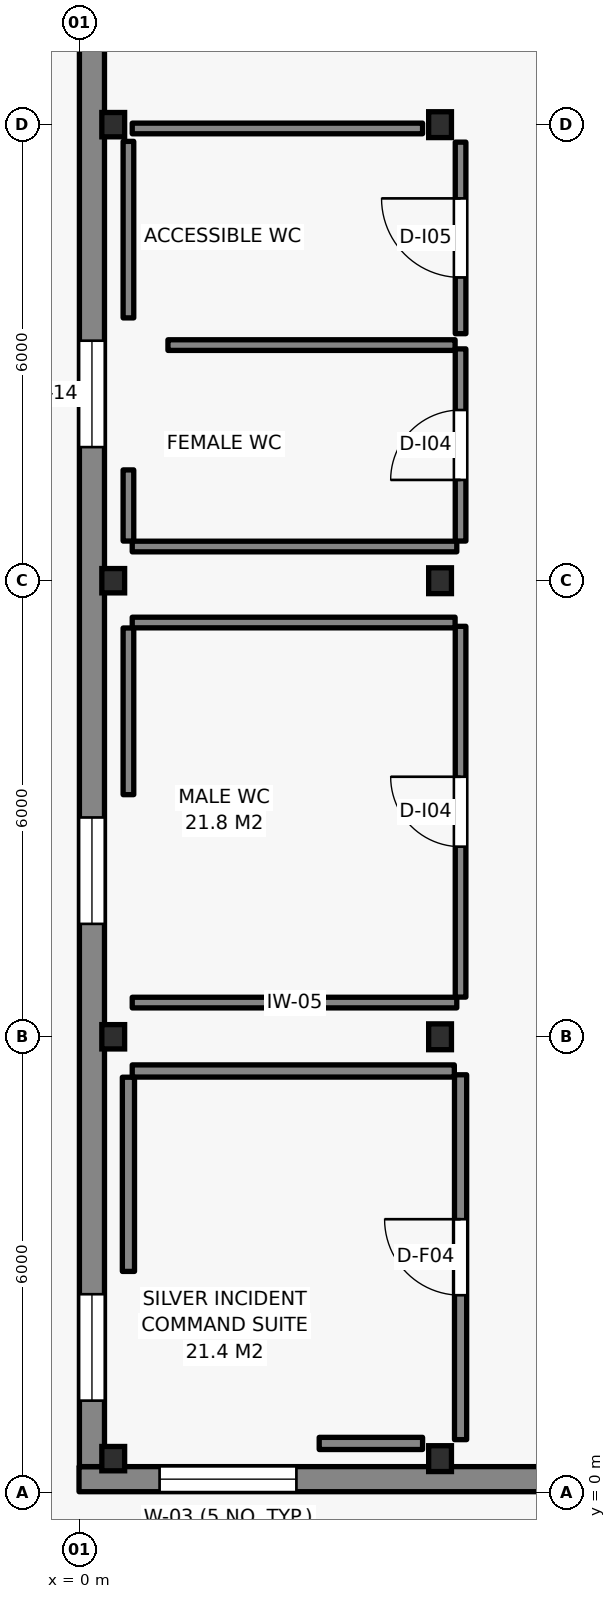
"""IFC4 building model, lengths in metres.
Left out: names, types, materials, properties, quantities, classifications, styles, units other than length and angle.
Written with IfcOpenShell. Run it as: python <this file> out.ifc"""

import sys

from ifc_helpers import new_model, si_unit, direction, frame, frame_2d, origin, origin_2d, place, context, subcontext, project, spatial, rectangle, i_section, extrude, element, fill, save


model = new_model("IFC4")
c1 = context("Model", 3, precision=1e-05, world=origin(), true_north=direction((0.0, 1.0)))
c2 = subcontext(c1, "Body", "Model", "MODEL_VIEW")
j1 = project(units=[si_unit("LENGTHUNIT", "METRE"), si_unit("PLANEANGLEUNIT", "RADIAN")], contexts=[c1])
p1 = place(None, origin())
s1 = spatial("IfcSite", under=j1, at=p1, CompositionType="ELEMENT")
p2 = place(p1, origin())
s2 = spatial("IfcBuilding", under=s1, at=p2, CompositionType="ELEMENT")
p3 = place(p2, frame((0.0, 0.0, 18.75)))
s3 = spatial("IfcBuildingStorey", under=s2, at=p3, CompositionType="ELEMENT", Elevation=18.75)
for number, where, z_axis, x_axis in (
    (1, (0.45, 0.45, 0.0), (0.0, 0.0, 1.0), (1.0, 0.0, 0.0)),
    (2, (0.45, 6.0, 0.0), (0.0, 0.0, 1.0), (1.0, 0.0, 0.0)),
    (3, (0.45, 12.0, 0.0), (0.0, 0.0, 1.0), (1.0, 0.0, 0.0)),
    (4, (0.45, 18.0, 0.0), (0.0, 0.0, 1.0), (1.0, 0.0, 0.0)),
):
    element("IfcColumn", number, at=place(p3, frame(where, z_axis=z_axis, x_axis=x_axis)), inside=s3, PredefinedType="COLUMN", context=c2, shape_type="SweptSolid", body=[
        extrude(i_section(OverallWidth=0.3, OverallDepth=0.32, WebThickness=0.011, FlangeThickness=0.021, FilletRadius=0.027, at=origin_2d()), origin(), (0.0, 0.0, 1.0), 3.71),
    ])
for number, where, z_axis, x_axis in (
    (5, (4.75, 0.45, 0.0), (0.0, 0.0, 1.0), (1.0, 0.0, 0.0)),
    (6, (4.75, 6.0, 0.0), (0.0, 0.0, 1.0), (1.0, 0.0, 0.0)),
    (7, (4.75, 12.0, 0.0), (0.0, 0.0, 1.0), (1.0, 0.0, 0.0)),
    (8, (4.75, 18.0, 0.0), (0.0, 0.0, 1.0), (1.0, 0.0, 0.0)),
):
    element("IfcColumn", number, at=place(p3, frame(where, z_axis=z_axis, x_axis=x_axis)), inside=s3, PredefinedType="COLUMN", context=c2, shape_type="SweptSolid", body=[
        extrude(i_section(OverallWidth=0.3, OverallDepth=0.34, WebThickness=0.012, FlangeThickness=0.021, FilletRadius=0.027, at=origin_2d()), origin(), (0.0, 0.0, 1.0), 3.71),
    ])
p4 = place(p3, frame((0.0, 0.18, 0.0), z_axis=(0.0, 0.0, 1.0), x_axis=(1.0, 0.0, 0.0)))
e9 = element("IfcWall", 9, at=p4, inside=s3, PredefinedType="SOLIDWALL", context=c2, shape_type="SweptSolid", body=[
    extrude(rectangle(XDim=19.6, YDim=0.33, at=frame_2d((9.8, 0.0))), origin(), (0.0, 0.0, 1.0), 3.505),
])
p5 = place(p4, frame((1.06, 0.0, 0.915)))
e10 = element("IfcOpeningElement", 10, at=p5, cuts=e9, PredefinedType="OPENING", context=c2, shape_type="SweptSolid", body=[
    extrude(rectangle(XDim=1.8, YDim=2.35, at=frame_2d((0.9, 1.175))), frame((0.0, 0.175, 0.0), z_axis=(0.0, -1.0, 0.0), x_axis=(1.0, 0.0, 0.0)), (0.0, 0.0, 1.0), 0.35),
])
p6 = place(p4, frame((8.9, 0.0, 0.915)))
e11 = element("IfcOpeningElement", 11, at=p6, cuts=e9, PredefinedType="OPENING", context=c2, shape_type="SweptSolid", body=[
    extrude(rectangle(XDim=1.8, YDim=2.35, at=frame_2d((0.9, 1.175))), frame((0.0, 0.175, 0.0), z_axis=(0.0, -1.0, 0.0), x_axis=(1.0, 0.0, 0.0)), (0.0, 0.0, 1.0), 0.35),
])
p7 = place(p4, frame((12.82, 0.0, 0.915)))
e12 = element("IfcOpeningElement", 12, at=p7, cuts=e9, PredefinedType="OPENING", context=c2, shape_type="SweptSolid", body=[
    extrude(rectangle(XDim=1.8, YDim=2.35, at=frame_2d((0.9, 1.175))), frame((0.0, 0.175, 0.0), z_axis=(0.0, -1.0, 0.0), x_axis=(1.0, 0.0, 0.0)), (0.0, 0.0, 1.0), 0.35),
])
p8 = place(p4, frame((16.74, 0.0, 0.915)))
e13 = element("IfcOpeningElement", 13, at=p8, cuts=e9, PredefinedType="OPENING", context=c2, shape_type="SweptSolid", body=[
    extrude(rectangle(XDim=1.8, YDim=2.35, at=frame_2d((0.9, 1.175))), frame((0.0, 0.175, 0.0), z_axis=(0.0, -1.0, 0.0), x_axis=(1.0, 0.0, 0.0)), (0.0, 0.0, 1.0), 0.35),
])
p9 = place(p3, frame((0.17, 53.66, 0.0), z_axis=(0.0, 0.0, 1.0), x_axis=(0.0, -1.0, 0.0)))
e14 = element("IfcWall", 14, at=p9, inside=s3, PredefinedType="SOLIDWALL", context=c2, shape_type="SweptSolid", body=[
    extrude(rectangle(XDim=53.315, YDim=0.33, at=frame_2d((26.657, 0.0))), origin(), (0.0, 0.0, 1.0), 3.345),
])
p10 = place(p9, frame((0.868, 0.0, 1.005)))
e15 = element("IfcOpeningElement", 15, at=p10, cuts=e14, PredefinedType="OPENING", context=c2, shape_type="SweptSolid", body=[
    extrude(rectangle(XDim=1.4, YDim=2.1, at=frame_2d((0.7, 1.05))), frame((0.0, 0.175, 0.0), z_axis=(0.0, -1.0, 0.0), x_axis=(1.0, 0.0, 0.0)), (0.0, 0.0, 1.0), 0.35),
])
p11 = place(p9, frame((7.14, 0.0, 1.005)))
e16 = element("IfcOpeningElement", 16, at=p11, cuts=e14, PredefinedType="OPENING", context=c2, shape_type="SweptSolid", body=[
    extrude(rectangle(XDim=1.4, YDim=2.1, at=frame_2d((0.7, 1.05))), frame((0.0, 0.175, 0.0), z_axis=(0.0, -1.0, 0.0), x_axis=(1.0, 0.0, 0.0)), (0.0, 0.0, 1.0), 0.35),
])
p12 = place(p9, frame((13.413, 0.0, 1.005)))
e17 = element("IfcOpeningElement", 17, at=p12, cuts=e14, PredefinedType="OPENING", context=c2, shape_type="SweptSolid", body=[
    extrude(rectangle(XDim=1.4, YDim=2.1, at=frame_2d((0.7, 1.05))), frame((0.0, 0.175, 0.0), z_axis=(0.0, -1.0, 0.0), x_axis=(1.0, 0.0, 0.0)), (0.0, 0.0, 1.0), 0.35),
])
p13 = place(p9, frame((19.685, 0.0, 1.005)))
e18 = element("IfcOpeningElement", 18, at=p13, cuts=e14, PredefinedType="OPENING", context=c2, shape_type="SweptSolid", body=[
    extrude(rectangle(XDim=1.4, YDim=2.1, at=frame_2d((0.7, 1.05))), frame((0.0, 0.175, 0.0), z_axis=(0.0, -1.0, 0.0), x_axis=(1.0, 0.0, 0.0)), (0.0, 0.0, 1.0), 0.35),
])
p14 = place(p9, frame((25.958, 0.0, 1.005)))
e19 = element("IfcOpeningElement", 19, at=p14, cuts=e14, PredefinedType="OPENING", context=c2, shape_type="SweptSolid", body=[
    extrude(rectangle(XDim=1.4, YDim=2.1, at=frame_2d((0.7, 1.05))), frame((0.0, 0.175, 0.0), z_axis=(0.0, -1.0, 0.0), x_axis=(1.0, 0.0, 0.0)), (0.0, 0.0, 1.0), 0.35),
])
p15 = place(p9, frame((32.23, 0.0, 1.005)))
e20 = element("IfcOpeningElement", 20, at=p15, cuts=e14, PredefinedType="OPENING", context=c2, shape_type="SweptSolid", body=[
    extrude(rectangle(XDim=1.4, YDim=2.1, at=frame_2d((0.7, 1.05))), frame((0.0, 0.175, 0.0), z_axis=(0.0, -1.0, 0.0), x_axis=(1.0, 0.0, 0.0)), (0.0, 0.0, 1.0), 0.35),
])
p16 = place(p9, frame((38.502, 0.0, 1.005)))
e21 = element("IfcOpeningElement", 21, at=p16, cuts=e14, PredefinedType="OPENING", context=c2, shape_type="SweptSolid", body=[
    extrude(rectangle(XDim=1.4, YDim=2.1, at=frame_2d((0.7, 1.05))), frame((0.0, 0.175, 0.0), z_axis=(0.0, -1.0, 0.0), x_axis=(1.0, 0.0, 0.0)), (0.0, 0.0, 1.0), 0.35),
])
p17 = place(p9, frame((44.775, 0.0, 1.005)))
e22 = element("IfcOpeningElement", 22, at=p17, cuts=e14, PredefinedType="OPENING", context=c2, shape_type="SweptSolid", body=[
    extrude(rectangle(XDim=1.4, YDim=2.1, at=frame_2d((0.7, 1.05))), frame((0.0, 0.175, 0.0), z_axis=(0.0, -1.0, 0.0), x_axis=(1.0, 0.0, 0.0)), (0.0, 0.0, 1.0), 0.35),
])
p18 = place(p9, frame((51.047, 0.0, 1.005)))
e23 = element("IfcOpeningElement", 23, at=p18, cuts=e14, PredefinedType="OPENING", context=c2, shape_type="SweptSolid", body=[
    extrude(rectangle(XDim=1.4, YDim=2.1, at=frame_2d((0.7, 1.05))), frame((0.0, 0.175, 0.0), z_axis=(0.0, -1.0, 0.0), x_axis=(1.0, 0.0, 0.0)), (0.0, 0.0, 1.0), 0.35),
])
p19 = place(p3, frame((3.16, 0.65, 0.0), z_axis=(0.0, 0.0, 1.0), x_axis=(1.0, 0.0, 0.0)))
e24 = element("IfcWall", 24, at=p19, inside=s3, PredefinedType="PARTITIONING", context=c2, shape_type="SweptSolid", body=[
    extrude(rectangle(XDim=1.36, YDim=0.16, at=frame_2d((0.68, 0.0))), origin(), (0.0, 0.0, 1.0), 3.345),
])
p20 = place(p3, frame((5.02, 0.7, 0.0), z_axis=(0.0, 0.0, 1.0), x_axis=(0.0, 1.0, 0.0)))
e25 = element("IfcWall", 25, at=p20, inside=s3, PredefinedType="PARTITIONING", context=c2, shape_type="SweptSolid", body=[
    extrude(rectangle(XDim=4.8, YDim=0.16, at=frame_2d((2.4, 0.0))), origin(), (0.0, 0.0, 1.0), 3.345),
])
p21 = place(p20, frame((1.9, 0.0, 0.0)))
e26 = element("IfcOpeningElement", 26, at=p21, cuts=e25, PredefinedType="OPENING", context=c2, shape_type="SweptSolid", body=[
    extrude(rectangle(XDim=1.0, YDim=2.15, at=frame_2d((0.5, 1.075))), frame((0.0, 0.09, 0.0), z_axis=(0.0, -1.0, 0.0), x_axis=(1.0, 0.0, 0.0)), (0.0, 0.0, 1.0), 0.18),
])
p22 = place(p3, frame((4.938, 5.55, 0.0), z_axis=(0.0, 0.0, 1.0), x_axis=(-1.0, 0.0, 0.0)))
e27 = element("IfcWall", 27, at=p22, inside=s3, PredefinedType="PARTITIONING", context=c2, shape_type="SweptSolid", body=[
    extrude(rectangle(XDim=4.238, YDim=0.16, at=frame_2d((2.119, 0.0))), origin(), (0.0, 0.0, 1.0), 3.345),
])
p23 = place(p3, frame((0.65, 5.468, 0.0), z_axis=(0.0, 0.0, 1.0), x_axis=(0.0, -1.0, 0.0)))
e28 = element("IfcWall", 28, at=p23, inside=s3, PredefinedType="PARTITIONING", context=c2, shape_type="SweptSolid", body=[
    extrude(rectangle(XDim=2.555, YDim=0.16, at=frame_2d((1.277, 0.0))), origin(), (0.0, 0.0, 1.0), 3.345),
])
p24 = place(p3, frame((0.7, 6.45, 0.0), z_axis=(0.0, 0.0, 1.0), x_axis=(1.0, 0.0, 0.0)))
e29 = element("IfcWall", 29, at=p24, inside=s3, PredefinedType="PARTITIONING", context=c2, shape_type="SweptSolid", body=[
    extrude(rectangle(XDim=4.27, YDim=0.14, at=frame_2d((2.135, 0.0))), origin(), (0.0, 0.0, 1.0), 3.345),
])
p25 = place(p3, frame((5.02, 6.522, 0.0), z_axis=(0.0, 0.0, 1.0), x_axis=(0.0, 1.0, 0.0)))
e30 = element("IfcWall", 30, at=p25, inside=s3, PredefinedType="PARTITIONING", context=c2, shape_type="SweptSolid", body=[
    extrude(rectangle(XDim=4.878, YDim=0.14, at=frame_2d((2.439, 0.0))), origin(), (0.0, 0.0, 1.0), 3.345),
])
p26 = place(p25, frame((1.979, 0.0, 0.0)))
e31 = element("IfcOpeningElement", 31, at=p26, cuts=e30, PredefinedType="OPENING", context=c2, shape_type="SweptSolid", body=[
    extrude(rectangle(XDim=0.92, YDim=2.08, at=frame_2d((0.46, 1.04))), frame((0.0, 0.08, 0.0), z_axis=(0.0, -1.0, 0.0), x_axis=(1.0, 0.0, 0.0)), (0.0, 0.0, 1.0), 0.16),
])
p27 = place(p3, frame((4.948, 11.45, 0.0), z_axis=(0.0, 0.0, 1.0), x_axis=(-1.0, 0.0, 0.0)))
e32 = element("IfcWall", 32, at=p27, inside=s3, PredefinedType="PARTITIONING", context=c2, shape_type="SweptSolid", body=[
    extrude(rectangle(XDim=4.248, YDim=0.14, at=frame_2d((2.124, 0.0))), origin(), (0.0, 0.0, 1.0), 3.345),
])
p28 = place(p3, frame((0.65, 11.378, 0.0), z_axis=(0.0, 0.0, 1.0), x_axis=(0.0, -1.0, 0.0)))
e33 = element("IfcWall", 33, at=p28, inside=s3, PredefinedType="PARTITIONING", context=c2, shape_type="SweptSolid", body=[
    extrude(rectangle(XDim=2.193, YDim=0.14, at=frame_2d((1.096, 0.0))), origin(), (0.0, 0.0, 1.0), 3.345),
])
p29 = place(p3, frame((0.7, 12.45, 0.0), z_axis=(0.0, 0.0, 1.0), x_axis=(1.0, 0.0, 0.0)))
e34 = element("IfcWall", 34, at=p29, inside=s3, PredefinedType="PARTITIONING", context=c2, shape_type="SweptSolid", body=[
    extrude(rectangle(XDim=4.27, YDim=0.14, at=frame_2d((2.135, 0.0))), origin(), (0.0, 0.0, 1.0), 3.345),
])
p30 = place(p3, frame((5.02, 12.522, 0.0), z_axis=(0.0, 0.0, 1.0), x_axis=(0.0, 1.0, 0.0)))
e35 = element("IfcWall", 35, at=p30, inside=s3, PredefinedType="PARTITIONING", context=c2, shape_type="SweptSolid", body=[
    extrude(rectangle(XDim=2.528, YDim=0.14, at=frame_2d((1.264, 0.0))), origin(), (0.0, 0.0, 1.0), 3.345),
])
p31 = place(p30, frame((0.804, 0.0, 0.0)))
e36 = element("IfcOpeningElement", 36, at=p31, cuts=e35, PredefinedType="OPENING", context=c2, shape_type="SweptSolid", body=[
    extrude(rectangle(XDim=0.92, YDim=2.08, at=frame_2d((0.46, 1.04))), frame((0.0, 0.08, 0.0), z_axis=(0.0, -1.0, 0.0), x_axis=(1.0, 0.0, 0.0)), (0.0, 0.0, 1.0), 0.16),
])
p32 = place(p3, frame((4.948, 15.1, 0.0), z_axis=(0.0, 0.0, 1.0), x_axis=(-1.0, 0.0, 0.0)))
e37 = element("IfcWall", 37, at=p32, inside=s3, PredefinedType="PARTITIONING", context=c2, shape_type="SweptSolid", body=[
    extrude(rectangle(XDim=3.778, YDim=0.14, at=frame_2d((1.889, 0.0))), origin(), (0.0, 0.0, 1.0), 3.345),
])
p33 = place(p3, frame((0.65, 13.458, 0.0), z_axis=(0.0, 0.0, 1.0), x_axis=(0.0, -1.0, 0.0)))
e38 = element("IfcWall", 38, at=p33, inside=s3, PredefinedType="PARTITIONING", context=c2, shape_type="SweptSolid", body=[
    extrude(rectangle(XDim=0.936, YDim=0.14, at=frame_2d((0.468, 0.0))), origin(), (0.0, 0.0, 1.0), 3.345),
])
p34 = place(p3, frame((5.02, 15.25, 0.0), z_axis=(0.0, 0.0, 1.0), x_axis=(0.0, 1.0, 0.0)))
e39 = element("IfcWall", 39, at=p34, inside=s3, PredefinedType="PARTITIONING", context=c2, shape_type="SweptSolid", body=[
    extrude(rectangle(XDim=2.52, YDim=0.14, at=frame_2d((1.26, 0.0))), origin(), (0.0, 0.0, 1.0), 3.345),
])
p35 = place(p34, frame((0.74, 0.0, 0.0)))
e40 = element("IfcOpeningElement", 40, at=p35, cuts=e39, PredefinedType="OPENING", context=c2, shape_type="SweptSolid", body=[
    extrude(rectangle(XDim=1.04, YDim=2.1, at=frame_2d((0.52, 1.05))), frame((0.0, 0.08, 0.0), z_axis=(0.0, -1.0, 0.0), x_axis=(1.0, 0.0, 0.0)), (0.0, 0.0, 1.0), 0.16),
])
p36 = place(p3, frame((4.52, 17.95, 0.0), z_axis=(0.0, 0.0, 1.0), x_axis=(-1.0, 0.0, 0.0)))
e41 = element("IfcWall", 41, at=p36, inside=s3, PredefinedType="PARTITIONING", context=c2, shape_type="SweptSolid", body=[
    extrude(rectangle(XDim=3.82, YDim=0.14, at=frame_2d((1.91, 0.0))), origin(), (0.0, 0.0, 1.0), 3.345),
])
p37 = place(p3, frame((0.65, 17.78, 0.0), z_axis=(0.0, 0.0, 1.0), x_axis=(0.0, -1.0, 0.0)))
e42 = element("IfcWall", 42, at=p37, inside=s3, PredefinedType="PARTITIONING", context=c2, shape_type="SweptSolid", body=[
    extrude(rectangle(XDim=2.322, YDim=0.14, at=frame_2d((1.161, 0.0))), origin(), (0.0, 0.0, 1.0), 3.345),
])
p38 = place(p5, origin())
e43 = element("IfcWindow", 43, at=p38, inside=s3, PartitioningType="SINGLE_PANEL", PredefinedType="WINDOW", context=c2, shape_type="SweptSolid", body=[
    extrude(rectangle(XDim=1.8, YDim=2.35, at=frame_2d((0.9, 1.175))), frame((0.0, 0.03, 0.0), z_axis=(0.0, -1.0, 0.0), x_axis=(1.0, 0.0, 0.0)), (0.0, 0.0, 1.0), 0.06),
])
fill(e10, e43)
p39 = place(p16, origin())
e44 = element("IfcWindow", 44, at=p39, inside=s3, PartitioningType="SINGLE_PANEL", PredefinedType="WINDOW", context=c2, shape_type="SweptSolid", body=[
    extrude(rectangle(XDim=1.4, YDim=2.1, at=frame_2d((0.7, 1.05))), frame((0.0, 0.03, 0.0), z_axis=(0.0, -1.0, 0.0), x_axis=(1.0, 0.0, 0.0)), (0.0, 0.0, 1.0), 0.06),
])
fill(e21, e44)
p40 = place(p17, origin())
e45 = element("IfcWindow", 45, at=p40, inside=s3, PartitioningType="SINGLE_PANEL", PredefinedType="WINDOW", context=c2, shape_type="SweptSolid", body=[
    extrude(rectangle(XDim=1.4, YDim=2.1, at=frame_2d((0.7, 1.05))), frame((0.0, 0.03, 0.0), z_axis=(0.0, -1.0, 0.0), x_axis=(1.0, 0.0, 0.0)), (0.0, 0.0, 1.0), 0.06),
])
fill(e22, e45)
p41 = place(p18, origin())
e46 = element("IfcWindow", 46, at=p41, inside=s3, PartitioningType="SINGLE_PANEL", PredefinedType="WINDOW", context=c2, shape_type="SweptSolid", body=[
    extrude(rectangle(XDim=1.4, YDim=2.1, at=frame_2d((0.7, 1.05))), frame((0.0, 0.03, 0.0), z_axis=(0.0, -1.0, 0.0), x_axis=(1.0, 0.0, 0.0)), (0.0, 0.0, 1.0), 0.06),
])
fill(e23, e46)
p42 = place(p21, origin())
e47 = element("IfcDoor", 47, at=p42, inside=s3, OperationType="SINGLE_SWING_RIGHT", PredefinedType="DOOR", context=c2, shape_type="SweptSolid", body=[
    extrude(rectangle(XDim=1.0, YDim=2.15, at=frame_2d((0.5, 1.075))), frame((0.0, 0.025, 0.0), z_axis=(0.0, -1.0, 0.0), x_axis=(1.0, 0.0, 0.0)), (0.0, 0.0, 1.0), 0.05),
])
fill(e26, e47)
p43 = place(p26, origin())
e48 = element("IfcDoor", 48, at=p43, inside=s3, OperationType="SINGLE_SWING_RIGHT", PredefinedType="DOOR", context=c2, shape_type="SweptSolid", body=[
    extrude(rectangle(XDim=0.92, YDim=2.08, at=frame_2d((0.46, 1.04))), frame((0.0, 0.025, 0.0), z_axis=(0.0, -1.0, 0.0), x_axis=(1.0, 0.0, 0.0)), (0.0, 0.0, 1.0), 0.05),
])
fill(e31, e48)
p44 = place(p31, origin())
e49 = element("IfcDoor", 49, at=p44, inside=s3, OperationType="SINGLE_SWING_LEFT", PredefinedType="DOOR", context=c2, shape_type="SweptSolid", body=[
    extrude(rectangle(XDim=0.92, YDim=2.08, at=frame_2d((0.46, 1.04))), frame((0.0, 0.025, 0.0), z_axis=(0.0, -1.0, 0.0), x_axis=(1.0, 0.0, 0.0)), (0.0, 0.0, 1.0), 0.05),
])
fill(e36, e49)
p45 = place(p35, origin())
e50 = element("IfcDoor", 50, at=p45, inside=s3, OperationType="SINGLE_SWING_RIGHT", PredefinedType="DOOR", context=c2, shape_type="SweptSolid", body=[
    extrude(rectangle(XDim=1.04, YDim=2.1, at=frame_2d((0.52, 1.05))), frame((0.0, 0.025, 0.0), z_axis=(0.0, -1.0, 0.0), x_axis=(1.0, 0.0, 0.0)), (0.0, 0.0, 1.0), 0.05),
])
fill(e40, e50)
save(model, sys.argv[1])
